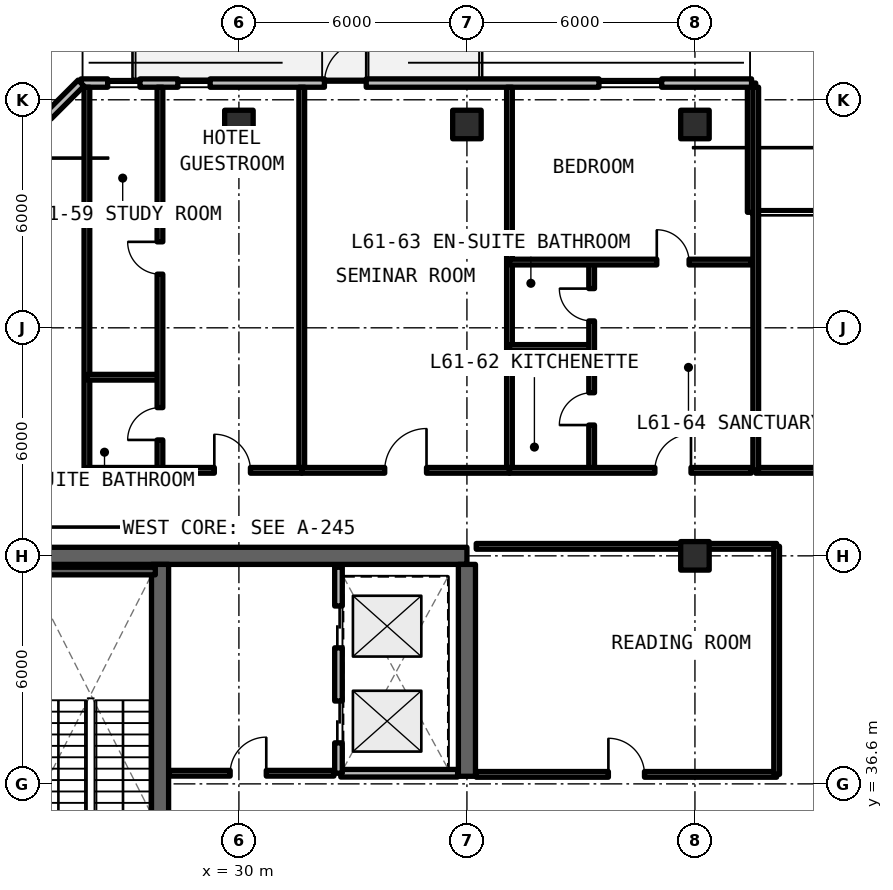
"""IFC4 building model, lengths in metres.
Left out: names, types, materials, properties, quantities, classifications, styles, units other than length and angle.
Written with IfcOpenShell. Run it as: python <this file> out.ifc"""

import sys

from ifc_helpers import new_model, si_unit, direction, frame, frame_2d, origin, origin_2d, place, context, subcontext, project, spatial, rectangle, extrude, element, fill, save


model = new_model("IFC4")
c1 = context("Model", 3, precision=1e-05, world=origin(), true_north=direction((0.0, 1.0)))
c2 = subcontext(c1, "Body", "Model", "MODEL_VIEW")
j1 = project(units=[si_unit("LENGTHUNIT", "METRE"), si_unit("PLANEANGLEUNIT", "RADIAN")], contexts=[c1])
p1 = place(None, origin())
s1 = spatial("IfcSite", under=j1, at=p1, CompositionType="ELEMENT")
p2 = place(p1, origin())
s2 = spatial("IfcBuilding", under=s1, at=p2, CompositionType="ELEMENT")
p3 = place(p2, frame((0.0, 0.0, 219.12)))
s3 = spatial("IfcBuildingStorey", under=s2, at=p3, CompositionType="ELEMENT", Elevation=219.12)
p4 = place(p3, frame((36.0, 42.6, 0.0), z_axis=(0.0, 0.0, 1.0), x_axis=(-1.0, 0.0, 0.0)))
e1 = element("IfcWall", 1, at=p4, inside=s3, PredefinedType="SHEAR", context=c2, shape_type="SweptSolid", body=[
    extrude(rectangle(XDim=12.0, YDim=0.45, at=frame_2d((6.0, 0.0))), origin(), (0.0, 0.0, 1.0), 3.63),
])
p5 = place(p3, frame((36.0, 36.8, 0.0), z_axis=(0.0, 0.0, 1.0), x_axis=(0.0, 1.0, 0.0)))
e2 = element("IfcWall", 2, at=p5, inside=s3, PredefinedType="SHEAR", context=c2, shape_type="SweptSolid", body=[
    extrude(rectangle(XDim=5.575, YDim=0.45, at=frame_2d((2.788, 0.0))), origin(), (0.0, 0.0, 1.0), 3.63),
])
p6 = place(p3, frame((27.925, 24.825, 0.0), z_axis=(0.0, 0.0, 1.0), x_axis=(0.0, 1.0, 0.0)))
e3 = element("IfcWall", 3, at=p6, inside=s3, PredefinedType="SHEAR", context=c2, shape_type="SweptSolid", body=[
    extrude(rectangle(XDim=17.55, YDim=0.45, at=frame_2d((8.775, 0.0))), origin(), (0.0, 0.0, 1.0), 3.63),
])
p7 = place(p6, frame((0.425, 0.0, 0.0)))
e4 = element("IfcOpeningElement", 4, at=p7, cuts=e3, PredefinedType="OPENING", context=c2, shape_type="SweptSolid", body=[
    extrude(rectangle(XDim=1.15, YDim=2.15, at=frame_2d((0.575, 1.075))), frame((0.0, 0.235, 0.0), z_axis=(0.0, -1.0, 0.0), x_axis=(1.0, 0.0, 0.0)), (0.0, 0.0, 1.0), 0.47),
])
p8 = place(p6, frame((9.625, 0.0, 0.0)))
e5 = element("IfcOpeningElement", 5, at=p8, cuts=e3, PredefinedType="OPENING", context=c2, shape_type="SweptSolid", body=[
    extrude(rectangle(XDim=1.15, YDim=2.15, at=frame_2d((0.575, 1.075))), frame((0.0, 0.235, 0.0), z_axis=(0.0, -1.0, 0.0), x_axis=(1.0, 0.0, 0.0)), (0.0, 0.0, 1.0), 0.47),
])
for number, where, z_axis, x_axis in (
    (6, (42.0, 42.6, 0.0), (0.0, 0.0, 1.0), (1.0, 0.0, 0.0)),
    (7, (30.0, 53.95, 0.0), (0.0, 0.0, 1.0), (1.0, 0.0, 0.0)),
    (8, (36.0, 53.95, 0.0), (0.0, 0.0, 1.0), (1.0, 0.0, 0.0)),
    (9, (42.0, 53.95, 0.0), (0.0, 0.0, 1.0), (1.0, 0.0, 0.0)),
):
    element("IfcColumn", number, at=place(p3, frame(where, z_axis=z_axis, x_axis=x_axis)), inside=s3, PredefinedType="COLUMN", context=c2, shape_type="SweptSolid", body=[
        extrude(rectangle(XDim=0.75, YDim=0.75, at=origin_2d()), origin(), (0.0, 0.0, 1.0), 3.63),
    ])
p9 = place(p3, frame((43.49, 51.64, 0.0), z_axis=(0.0, 0.0, 1.0), x_axis=(0.0, 1.0, 0.0)))
e10 = element("IfcWall", 10, at=p9, inside=s3, PredefinedType="SOLIDWALL", context=c2, shape_type="SweptSolid", body=[
    extrude(rectangle(XDim=3.4, YDim=0.22, at=frame_2d((1.7, 0.0))), origin(), (0.0, 0.0, 1.0), 3.41),
])
p10 = place(p3, frame((43.49, 55.04, 0.0), z_axis=(0.0, 0.0, 1.0), x_axis=(-1.0, 0.0, 0.0)))
e11 = element("IfcWall", 11, at=p10, inside=s3, PredefinedType="SOLIDWALL", context=c2, shape_type="SweptSolid", body=[
    extrude(rectangle(XDim=17.644, YDim=0.22, at=frame_2d((8.822, 0.0))), origin(), (0.0, 0.0, 1.0), 3.41),
])
p11 = place(p10, frame((10.14, 0.0, 0.0)))
e12 = element("IfcOpeningElement", 12, at=p11, cuts=e11, PredefinedType="OPENING", context=c2, shape_type="SweptSolid", body=[
    extrude(rectangle(XDim=1.1, YDim=2.15, at=frame_2d((0.55, 1.075))), frame((0.0, 0.12, 0.0), z_axis=(0.0, -1.0, 0.0), x_axis=(1.0, 0.0, 0.0)), (0.0, 0.0, 1.0), 0.24),
])
p12 = place(p10, frame((16.094, 0.0, 0.78)))
e13 = element("IfcOpeningElement", 13, at=p12, cuts=e11, PredefinedType="OPENING", context=c2, shape_type="SweptSolid", body=[
    extrude(rectangle(XDim=0.85, YDim=1.65, at=frame_2d((0.425, 0.825))), frame((0.0, 0.12, 0.0), z_axis=(0.0, -1.0, 0.0), x_axis=(1.0, 0.0, 0.0)), (0.0, 0.0, 1.0), 0.24),
])
p13 = place(p10, frame((14.247, 0.0, 0.78)))
e14 = element("IfcOpeningElement", 14, at=p13, cuts=e11, PredefinedType="OPENING", context=c2, shape_type="SweptSolid", body=[
    extrude(rectangle(XDim=0.85, YDim=1.65, at=frame_2d((0.425, 0.825))), frame((0.0, 0.12, 0.0), z_axis=(0.0, -1.0, 0.0), x_axis=(1.0, 0.0, 0.0)), (0.0, 0.0, 1.0), 0.24),
])
p14 = place(p10, frame((2.365, 0.0, 0.78)))
e15 = element("IfcOpeningElement", 15, at=p14, cuts=e11, PredefinedType="OPENING", context=c2, shape_type="SweptSolid", body=[
    extrude(rectangle(XDim=1.65, YDim=1.66, at=frame_2d((0.825, 0.83))), frame((0.0, 0.12, 0.0), z_axis=(0.0, -1.0, 0.0), x_axis=(1.0, 0.0, 0.0)), (0.0, 0.0, 1.0), 0.24),
])
p15 = place(p3, frame((25.846, 55.04, 0.0), z_axis=(0.0, 0.0, 1.0), x_axis=(-0.707106781187, -0.707106781187, 0.0)))
e16 = element("IfcWall", 16, at=p15, inside=s3, PredefinedType="SOLIDWALL", context=c2, shape_type="SweptSolid", body=[
    extrude(rectangle(XDim=5.849, YDim=0.22, at=frame_2d((2.924, 0.0))), origin(), (0.0, 0.0, 1.0), 3.41),
])
p16 = place(p15, frame((1.224, 0.0, 0.78)))
e17 = element("IfcOpeningElement", 17, at=p16, cuts=e16, PredefinedType="OPENING", context=c2, shape_type="SweptSolid", body=[
    extrude(rectangle(XDim=3.4, YDim=1.66, at=frame_2d((1.7, 0.83))), frame((0.0, 0.12, 0.0), z_axis=(0.0, -1.0, 0.0), x_axis=(1.0, 0.0, 0.0)), (0.0, 0.0, 1.0), 0.24),
])
p17 = place(p3, frame((28.17, 36.88, 0.0), z_axis=(0.0, 0.0, 1.0), x_axis=(1.0, 0.0, 0.0)))
e18 = element("IfcWall", 18, at=p17, inside=s3, PredefinedType="SOLIDWALL", context=c2, shape_type="SweptSolid", body=[
    extrude(rectangle(XDim=4.33, YDim=0.15, at=frame_2d((2.165, 0.0))), origin(), (0.0, 0.0, 1.0), 2.63),
])
p18 = place(p17, frame((1.6, 0.0, 0.0)))
e19 = element("IfcOpeningElement", 19, at=p18, cuts=e18, PredefinedType="OPENING", context=c2, shape_type="SweptSolid", body=[
    extrude(rectangle(XDim=0.95, YDim=2.15, at=frame_2d((0.475, 1.075))), frame((0.0, 0.085, 0.0), z_axis=(0.0, -1.0, 0.0), x_axis=(1.0, 0.0, 0.0)), (0.0, 0.0, 1.0), 0.17),
])
p19 = place(p3, frame((32.68, 36.88, 0.0), z_axis=(0.0, 0.0, 1.0), x_axis=(1.0, 0.0, 0.0)))
e20 = element("IfcWall", 20, at=p19, inside=s3, PredefinedType="SOLIDWALL", context=c2, shape_type="SweptSolid", body=[
    extrude(rectangle(XDim=3.075, YDim=0.2, at=frame_2d((1.538, 0.0))), origin(), (0.0, 0.0, 1.0), 2.63),
])
p20 = place(p3, frame((32.62, 36.88, 0.0), z_axis=(0.0, 0.0, 1.0), x_axis=(0.0, 1.0, 0.0)))
e21 = element("IfcWall", 21, at=p20, inside=s3, PredefinedType="SOLIDWALL", context=c2, shape_type="SweptSolid", body=[
    extrude(rectangle(XDim=5.42, YDim=0.2, at=frame_2d((2.71, 0.0))), origin(), (0.0, 0.0, 1.0), 2.63),
])
p21 = place(p20, frame((0.8, 0.0, 0.0)))
e22 = element("IfcOpeningElement", 22, at=p21, cuts=e21, PredefinedType="OPENING", context=c2, shape_type="SweptSolid", body=[
    extrude(rectangle(XDim=1.1, YDim=2.2, at=frame_2d((0.55, 1.1))), frame((0.0, 0.11, 0.0), z_axis=(0.0, -1.0, 0.0), x_axis=(1.0, 0.0, 0.0)), (0.0, 0.0, 1.0), 0.22),
])
p22 = place(p20, frame((3.3, 0.0, 0.0)))
e23 = element("IfcOpeningElement", 23, at=p22, cuts=e21, PredefinedType="OPENING", context=c2, shape_type="SweptSolid", body=[
    extrude(rectangle(XDim=1.1, YDim=2.2, at=frame_2d((0.55, 1.1))), frame((0.0, 0.11, 0.0), z_axis=(0.0, -1.0, 0.0), x_axis=(1.0, 0.0, 0.0)), (0.0, 0.0, 1.0), 0.22),
])
p23 = place(p3, frame((36.245, 36.85, 0.0), z_axis=(0.0, 0.0, 1.0), x_axis=(1.0, 0.0, 0.0)))
e24 = element("IfcWall", 24, at=p23, inside=s3, PredefinedType="SOLIDWALL", context=c2, shape_type="SweptSolid", body=[
    extrude(rectangle(XDim=7.905, YDim=0.15, at=frame_2d((3.952, 0.0))), origin(), (0.0, 0.0, 1.0), 2.63),
])
p24 = place(p23, frame((3.478, 0.0, 0.0)))
e25 = element("IfcOpeningElement", 25, at=p24, cuts=e24, PredefinedType="OPENING", context=c2, shape_type="SweptSolid", body=[
    extrude(rectangle(XDim=0.95, YDim=2.15, at=frame_2d((0.475, 1.075))), frame((0.0, 0.085, 0.0), z_axis=(0.0, -1.0, 0.0), x_axis=(1.0, 0.0, 0.0)), (0.0, 0.0, 1.0), 0.17),
])
p25 = place(p3, frame((36.245, 42.85, 0.0), z_axis=(0.0, 0.0, 1.0), x_axis=(1.0, 0.0, 0.0)))
e26 = element("IfcWall", 26, at=p25, inside=s3, PredefinedType="SOLIDWALL", context=c2, shape_type="SweptSolid", body=[
    extrude(rectangle(XDim=7.905, YDim=0.15, at=frame_2d((3.952, 0.0))), origin(), (0.0, 0.0, 1.0), 2.63),
])
p26 = place(p3, frame((44.15, 36.85, 0.0), z_axis=(0.0, 0.0, 1.0), x_axis=(0.0, 1.0, 0.0)))
e27 = element("IfcWall", 27, at=p26, inside=s3, PredefinedType="SOLIDWALL", context=c2, shape_type="SweptSolid", body=[
    extrude(rectangle(XDim=6.0, YDim=0.15, at=frame_2d((3.0, 0.0))), origin(), (0.0, 0.0, 1.0), 2.63),
])
p27 = place(p3, frame((43.6, 44.85, 0.0), z_axis=(0.0, 0.0, 1.0), x_axis=(1.0, 0.0, 0.0)))
e28 = element("IfcWall", 28, at=p27, inside=s3, PredefinedType="SOLIDWALL", context=c2, shape_type="SweptSolid", body=[
    extrude(rectangle(XDim=8.4, YDim=0.15, at=frame_2d((4.2, 0.0))), origin(), (0.0, 0.0, 1.0), 2.63),
])
p28 = place(p27, frame((3.65, 0.0, 0.0)))
e29 = element("IfcOpeningElement", 29, at=p28, cuts=e28, PredefinedType="OPENING", context=c2, shape_type="SweptSolid", body=[
    extrude(rectangle(XDim=1.1, YDim=2.15, at=frame_2d((0.55, 1.075))), frame((0.0, 0.085, 0.0), z_axis=(0.0, -1.0, 0.0), x_axis=(1.0, 0.0, 0.0)), (0.0, 0.0, 1.0), 0.17),
])
for number, where, z_axis, x_axis in (
    (30, (43.6, 44.85, 0.0), (0.0, 0.0, 1.0), (0.0, 1.0, 0.0)),
    (31, (26.0, 44.85, 0.0), (0.0, 0.0, 1.0), (0.0, 1.0, 0.0)),
    (32, (31.654, 44.85, 0.0), (0.0, 0.0, 1.0), (0.0, 1.0, 0.0)),
):
    element("IfcWall", number, at=place(p3, frame(where, z_axis=z_axis, x_axis=x_axis)), inside=s3, PredefinedType="SOLIDWALL", context=c2, shape_type="SweptSolid", body=[
        extrude(rectangle(XDim=10.08, YDim=0.15, at=frame_2d((5.04, 0.0))), origin(), (0.0, 0.0, 1.0), 2.63),
    ])
p29 = place(p3, frame((26.0, 47.3, 0.0), z_axis=(0.0, 0.0, 1.0), x_axis=(1.0, 0.0, 0.0)))
e33 = element("IfcWall", 33, at=p29, inside=s3, PredefinedType="PARTITIONING", context=c2, shape_type="SweptSolid", body=[
    extrude(rectangle(XDim=1.922, YDim=0.15, at=frame_2d((0.961, 0.0))), origin(), (0.0, 0.0, 1.0), 2.63),
])
p30 = place(p3, frame((27.922, 44.85, 0.0), z_axis=(0.0, 0.0, 1.0), x_axis=(0.0, 1.0, 0.0)))
e34 = element("IfcWall", 34, at=p30, inside=s3, PredefinedType="PARTITIONING", context=c2, shape_type="SweptSolid", body=[
    extrude(rectangle(XDim=10.08, YDim=0.15, at=frame_2d((5.04, 0.0))), origin(), (0.0, 0.0, 1.0), 2.63),
])
p31 = place(p30, frame((0.8, 0.0, 0.0)))
e35 = element("IfcOpeningElement", 35, at=p31, cuts=e34, PredefinedType="OPENING", context=c2, shape_type="SweptSolid", body=[
    extrude(rectangle(XDim=0.85, YDim=2.1, at=frame_2d((0.425, 1.05))), frame((0.0, 0.085, 0.0), z_axis=(0.0, -1.0, 0.0), x_axis=(1.0, 0.0, 0.0)), (0.0, 0.0, 1.0), 0.17),
])
p32 = place(p30, frame((5.162, 0.0, 0.0)))
e36 = element("IfcOpeningElement", 36, at=p32, cuts=e34, PredefinedType="OPENING", context=c2, shape_type="SweptSolid", body=[
    extrude(rectangle(XDim=0.85, YDim=2.1, at=frame_2d((0.425, 1.05))), frame((0.0, 0.085, 0.0), z_axis=(0.0, -1.0, 0.0), x_axis=(1.0, 0.0, 0.0)), (0.0, 0.0, 1.0), 0.17),
])
p33 = place(p3, frame((26.0, 44.85, 0.0), z_axis=(0.0, 0.0, 1.0), x_axis=(1.0, 0.0, 0.0)))
e37 = element("IfcWall", 37, at=p33, inside=s3, PredefinedType="SOLIDWALL", context=c2, shape_type="SweptSolid", body=[
    extrude(rectangle(XDim=5.654, YDim=0.15, at=frame_2d((2.827, 0.0))), origin(), (0.0, 0.0, 1.0), 2.63),
])
p34 = place(p33, frame((3.353, 0.0, 0.0)))
e38 = element("IfcOpeningElement", 38, at=p34, cuts=e37, PredefinedType="OPENING", context=c2, shape_type="SweptSolid", body=[
    extrude(rectangle(XDim=0.95, YDim=2.15, at=frame_2d((0.475, 1.075))), frame((0.0, 0.085, 0.0), z_axis=(0.0, -1.0, 0.0), x_axis=(1.0, 0.0, 0.0)), (0.0, 0.0, 1.0), 0.17),
])
p35 = place(p3, frame((37.119, 44.85, 0.0), z_axis=(0.0, 0.0, 1.0), x_axis=(0.0, 1.0, 0.0)))
e39 = element("IfcWall", 39, at=p35, inside=s3, PredefinedType="SOLIDWALL", context=c2, shape_type="SweptSolid", body=[
    extrude(rectangle(XDim=10.08, YDim=0.15, at=frame_2d((5.04, 0.0))), origin(), (0.0, 0.0, 1.0), 2.63),
])
p36 = place(p3, frame((31.654, 44.85, 0.0), z_axis=(0.0, 0.0, 1.0), x_axis=(1.0, 0.0, 0.0)))
e40 = element("IfcWall", 40, at=p36, inside=s3, PredefinedType="SOLIDWALL", context=c2, shape_type="SweptSolid", body=[
    extrude(rectangle(XDim=5.466, YDim=0.15, at=frame_2d((2.733, 0.0))), origin(), (0.0, 0.0, 1.0), 2.63),
])
p37 = place(p36, frame((2.183, 0.0, 0.0)))
e41 = element("IfcOpeningElement", 41, at=p37, cuts=e40, PredefinedType="OPENING", context=c2, shape_type="SweptSolid", body=[
    extrude(rectangle(XDim=1.1, YDim=2.15, at=frame_2d((0.55, 1.075))), frame((0.0, 0.085, 0.0), z_axis=(0.0, -1.0, 0.0), x_axis=(1.0, 0.0, 0.0)), (0.0, 0.0, 1.0), 0.17),
])
p38 = place(p3, frame((37.119, 48.083, 0.0), z_axis=(0.0, 0.0, 1.0), x_axis=(1.0, 0.0, 0.0)))
e42 = element("IfcWall", 42, at=p38, inside=s3, PredefinedType="PARTITIONING", context=c2, shape_type="SweptSolid", body=[
    extrude(rectangle(XDim=2.163, YDim=0.15, at=frame_2d((1.081, 0.0))), origin(), (0.0, 0.0, 1.0), 2.63),
])
p39 = place(p3, frame((39.282, 44.85, 0.0), z_axis=(0.0, 0.0, 1.0), x_axis=(0.0, 1.0, 0.0)))
e43 = element("IfcWall", 43, at=p39, inside=s3, PredefinedType="PARTITIONING", context=c2, shape_type="SweptSolid", body=[
    extrude(rectangle(XDim=5.48, YDim=0.15, at=frame_2d((2.74, 0.0))), origin(), (0.0, 0.0, 1.0), 2.63),
])
p40 = place(p39, frame((1.192, 0.0, 0.0)))
e44 = element("IfcOpeningElement", 44, at=p40, cuts=e43, PredefinedType="OPENING", context=c2, shape_type="SweptSolid", body=[
    extrude(rectangle(XDim=0.85, YDim=2.1, at=frame_2d((0.425, 1.05))), frame((0.0, 0.085, 0.0), z_axis=(0.0, -1.0, 0.0), x_axis=(1.0, 0.0, 0.0)), (0.0, 0.0, 1.0), 0.17),
])
p41 = place(p39, frame((3.932, 0.0, 0.0)))
e45 = element("IfcOpeningElement", 45, at=p41, cuts=e43, PredefinedType="OPENING", context=c2, shape_type="SweptSolid", body=[
    extrude(rectangle(XDim=0.85, YDim=2.1, at=frame_2d((0.425, 1.05))), frame((0.0, 0.085, 0.0), z_axis=(0.0, -1.0, 0.0), x_axis=(1.0, 0.0, 0.0)), (0.0, 0.0, 1.0), 0.17),
])
p42 = place(p3, frame((37.119, 50.33, 0.0), z_axis=(0.0, 0.0, 1.0), x_axis=(1.0, 0.0, 0.0)))
e46 = element("IfcWall", 46, at=p42, inside=s3, PredefinedType="PARTITIONING", context=c2, shape_type="SweptSolid", body=[
    extrude(rectangle(XDim=6.361, YDim=0.15, at=frame_2d((3.18, 0.0))), origin(), (0.0, 0.0, 1.0), 2.63),
])
p43 = place(p42, frame((3.877, 0.0, 0.0)))
e47 = element("IfcOpeningElement", 47, at=p43, cuts=e46, PredefinedType="OPENING", context=c2, shape_type="SweptSolid", body=[
    extrude(rectangle(XDim=0.85, YDim=2.1, at=frame_2d((0.425, 1.05))), frame((0.0, 0.085, 0.0), z_axis=(0.0, -1.0, 0.0), x_axis=(1.0, 0.0, 0.0)), (0.0, 0.0, 1.0), 0.17),
])
p44 = place(p3, frame((37.119, 44.85, 0.0), z_axis=(0.0, 0.0, 1.0), x_axis=(1.0, 0.0, 0.0)))
e48 = element("IfcWall", 48, at=p44, inside=s3, PredefinedType="SOLIDWALL", context=c2, shape_type="SweptSolid", body=[
    extrude(rectangle(XDim=6.361, YDim=0.15, at=frame_2d((3.18, 0.0))), origin(), (0.0, 0.0, 1.0), 2.63),
])
p45 = place(p44, frame((3.827, 0.0, 0.0)))
e49 = element("IfcOpeningElement", 49, at=p45, cuts=e48, PredefinedType="OPENING", context=c2, shape_type="SweptSolid", body=[
    extrude(rectangle(XDim=0.95, YDim=2.15, at=frame_2d((0.475, 1.075))), frame((0.0, 0.085, 0.0), z_axis=(0.0, -1.0, 0.0), x_axis=(1.0, 0.0, 0.0)), (0.0, 0.0, 1.0), 0.17),
])
p46 = place(p3, frame((27.8, 42.2, 0.0), z_axis=(0.0, 0.0, 1.0), x_axis=(-1.0, 0.0, 0.0)))
e50 = element("IfcWall", 50, at=p46, inside=s3, PredefinedType="SOLIDWALL", context=c2, shape_type="SweptSolid", body=[
    extrude(rectangle(XDim=3.4, YDim=0.2, at=frame_2d((1.7, 0.0))), origin(), (0.0, 0.0, 1.0), 3.63),
])
p47 = place(p11, frame((1.1, 0.0, 0.0), z_axis=(0.0, 0.0, 1.0), x_axis=(-1.0, 0.0, 0.0)))
e51 = element("IfcDoor", 51, at=p47, inside=s3, OperationType="SINGLE_SWING_RIGHT", PredefinedType="DOOR", context=c2, shape_type="SweptSolid", body=[
    extrude(rectangle(XDim=1.1, YDim=2.15, at=frame_2d((0.55, 1.075))), frame((0.0, 0.025, 0.0), z_axis=(0.0, -1.0, 0.0), x_axis=(1.0, 0.0, 0.0)), (0.0, 0.0, 1.0), 0.05),
])
fill(e12, e51)
p48 = place(p12, origin())
e52 = element("IfcWindow", 52, at=p48, inside=s3, PartitioningType="SINGLE_PANEL", PredefinedType="WINDOW", context=c2, shape_type="SweptSolid", body=[
    extrude(rectangle(XDim=0.85, YDim=1.65, at=frame_2d((0.425, 0.825))), frame((0.0, 0.03, 0.0), z_axis=(0.0, -1.0, 0.0), x_axis=(1.0, 0.0, 0.0)), (0.0, 0.0, 1.0), 0.06),
])
fill(e13, e52)
p49 = place(p13, origin())
e53 = element("IfcWindow", 53, at=p49, inside=s3, PartitioningType="SINGLE_PANEL", PredefinedType="WINDOW", context=c2, shape_type="SweptSolid", body=[
    extrude(rectangle(XDim=0.85, YDim=1.65, at=frame_2d((0.425, 0.825))), frame((0.0, 0.03, 0.0), z_axis=(0.0, -1.0, 0.0), x_axis=(1.0, 0.0, 0.0)), (0.0, 0.0, 1.0), 0.06),
])
fill(e14, e53)
p50 = place(p14, origin())
e54 = element("IfcWindow", 54, at=p50, inside=s3, PartitioningType="SINGLE_PANEL", PredefinedType="WINDOW", context=c2, shape_type="SweptSolid", body=[
    extrude(rectangle(XDim=1.65, YDim=1.66, at=frame_2d((0.825, 0.83))), frame((0.0, 0.03, 0.0), z_axis=(0.0, -1.0, 0.0), x_axis=(1.0, 0.0, 0.0)), (0.0, 0.0, 1.0), 0.06),
])
fill(e15, e54)
p51 = place(p18, origin())
e55 = element("IfcDoor", 55, at=p51, inside=s3, OperationType="SINGLE_SWING_RIGHT", PredefinedType="DOOR", context=c2, shape_type="SweptSolid", body=[
    extrude(rectangle(XDim=0.95, YDim=2.15, at=frame_2d((0.475, 1.075))), frame((0.0, 0.025, 0.0), z_axis=(0.0, -1.0, 0.0), x_axis=(1.0, 0.0, 0.0)), (0.0, 0.0, 1.0), 0.05),
])
fill(e19, e55)
p52 = place(p21, origin())
e56 = element("IfcDoor", 56, at=p52, inside=s3, OperationType="SLIDING_TO_LEFT", PredefinedType="DOOR", context=c2, shape_type="SweptSolid", body=[
    extrude(rectangle(XDim=1.1, YDim=2.2, at=frame_2d((0.55, 1.1))), frame((0.0, 0.025, 0.0), z_axis=(0.0, -1.0, 0.0), x_axis=(1.0, 0.0, 0.0)), (0.0, 0.0, 1.0), 0.05),
])
fill(e22, e56)
p53 = place(p22, origin())
e57 = element("IfcDoor", 57, at=p53, inside=s3, OperationType="SLIDING_TO_RIGHT", PredefinedType="DOOR", context=c2, shape_type="SweptSolid", body=[
    extrude(rectangle(XDim=1.1, YDim=2.2, at=frame_2d((0.55, 1.1))), frame((0.0, 0.025, 0.0), z_axis=(0.0, -1.0, 0.0), x_axis=(1.0, 0.0, 0.0)), (0.0, 0.0, 1.0), 0.05),
])
fill(e23, e57)
p54 = place(p24, origin())
e58 = element("IfcDoor", 58, at=p54, inside=s3, OperationType="SINGLE_SWING_LEFT", PredefinedType="DOOR", context=c2, shape_type="SweptSolid", body=[
    extrude(rectangle(XDim=0.95, YDim=2.15, at=frame_2d((0.475, 1.075))), frame((0.0, 0.025, 0.0), z_axis=(0.0, -1.0, 0.0), x_axis=(1.0, 0.0, 0.0)), (0.0, 0.0, 1.0), 0.05),
])
fill(e25, e58)
p55 = place(p31, origin())
e59 = element("IfcDoor", 59, at=p55, inside=s3, OperationType="SINGLE_SWING_LEFT", PredefinedType="DOOR", context=c2, shape_type="SweptSolid", body=[
    extrude(rectangle(XDim=0.85, YDim=2.1, at=frame_2d((0.425, 1.05))), frame((0.0, 0.025, 0.0), z_axis=(0.0, -1.0, 0.0), x_axis=(1.0, 0.0, 0.0)), (0.0, 0.0, 1.0), 0.05),
])
fill(e35, e59)
p56 = place(p32, origin())
e60 = element("IfcDoor", 60, at=p56, inside=s3, OperationType="SINGLE_SWING_RIGHT", PredefinedType="DOOR", context=c2, shape_type="SweptSolid", body=[
    extrude(rectangle(XDim=0.85, YDim=2.1, at=frame_2d((0.425, 1.05))), frame((0.0, 0.025, 0.0), z_axis=(0.0, -1.0, 0.0), x_axis=(1.0, 0.0, 0.0)), (0.0, 0.0, 1.0), 0.05),
])
fill(e36, e60)
p57 = place(p34, origin())
e61 = element("IfcDoor", 61, at=p57, inside=s3, OperationType="SINGLE_SWING_LEFT", PredefinedType="DOOR", context=c2, shape_type="SweptSolid", body=[
    extrude(rectangle(XDim=0.95, YDim=2.15, at=frame_2d((0.475, 1.075))), frame((0.0, 0.025, 0.0), z_axis=(0.0, -1.0, 0.0), x_axis=(1.0, 0.0, 0.0)), (0.0, 0.0, 1.0), 0.05),
])
fill(e38, e61)
p58 = place(p37, origin())
e62 = element("IfcDoor", 62, at=p58, inside=s3, OperationType="SINGLE_SWING_RIGHT", PredefinedType="DOOR", context=c2, shape_type="SweptSolid", body=[
    extrude(rectangle(XDim=1.1, YDim=2.15, at=frame_2d((0.55, 1.075))), frame((0.0, 0.025, 0.0), z_axis=(0.0, -1.0, 0.0), x_axis=(1.0, 0.0, 0.0)), (0.0, 0.0, 1.0), 0.05),
])
fill(e41, e62)
p59 = place(p40, origin())
e63 = element("IfcDoor", 63, at=p59, inside=s3, OperationType="SINGLE_SWING_LEFT", PredefinedType="DOOR", context=c2, shape_type="SweptSolid", body=[
    extrude(rectangle(XDim=0.85, YDim=2.1, at=frame_2d((0.425, 1.05))), frame((0.0, 0.025, 0.0), z_axis=(0.0, -1.0, 0.0), x_axis=(1.0, 0.0, 0.0)), (0.0, 0.0, 1.0), 0.05),
])
fill(e44, e63)
p60 = place(p41, origin())
e64 = element("IfcDoor", 64, at=p60, inside=s3, OperationType="SINGLE_SWING_RIGHT", PredefinedType="DOOR", context=c2, shape_type="SweptSolid", body=[
    extrude(rectangle(XDim=0.85, YDim=2.1, at=frame_2d((0.425, 1.05))), frame((0.0, 0.025, 0.0), z_axis=(0.0, -1.0, 0.0), x_axis=(1.0, 0.0, 0.0)), (0.0, 0.0, 1.0), 0.05),
])
fill(e45, e64)
p61 = place(p43, origin())
e65 = element("IfcDoor", 65, at=p61, inside=s3, OperationType="SINGLE_SWING_LEFT", PredefinedType="DOOR", context=c2, shape_type="SweptSolid", body=[
    extrude(rectangle(XDim=0.85, YDim=2.1, at=frame_2d((0.425, 1.05))), frame((0.0, 0.025, 0.0), z_axis=(0.0, -1.0, 0.0), x_axis=(1.0, 0.0, 0.0)), (0.0, 0.0, 1.0), 0.05),
])
fill(e47, e65)
p62 = place(p45, origin())
e66 = element("IfcDoor", 66, at=p62, inside=s3, OperationType="SINGLE_SWING_RIGHT", PredefinedType="DOOR", context=c2, shape_type="SweptSolid", body=[
    extrude(rectangle(XDim=0.95, YDim=2.15, at=frame_2d((0.475, 1.075))), frame((0.0, 0.025, 0.0), z_axis=(0.0, -1.0, 0.0), x_axis=(1.0, 0.0, 0.0)), (0.0, 0.0, 1.0), 0.05),
])
fill(e49, e66)
save(model, sys.argv[1])
